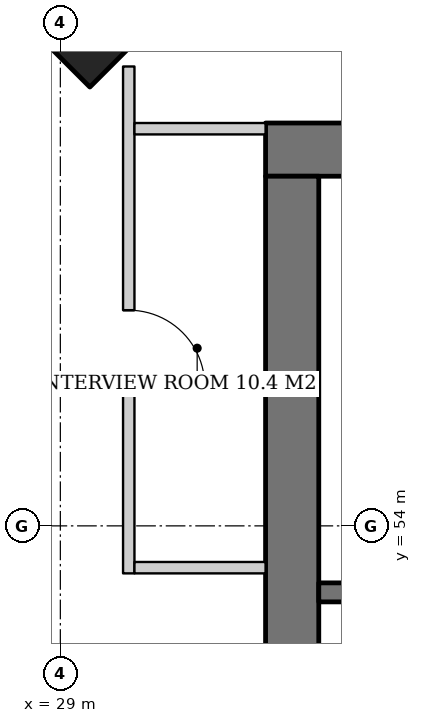
"""IFC4 building model, lengths in metres.
Left out: names, types, materials, properties, quantities, classifications, styles, units other than length and angle.
Written with IfcOpenShell. Run it as: python <this file> out.ifc"""

import sys

from ifc_helpers import new_model, si_unit, direction, frame, frame_2d, origin, origin_2d, place, context, subcontext, project, spatial, rectangle, extrude, element, fill, save


model = new_model("IFC4")
c1 = context("Model", 3, precision=1e-05, world=origin(), true_north=direction((0.0, 1.0)))
c2 = subcontext(c1, "Body", "Model", "MODEL_VIEW")
j1 = project(units=[si_unit("LENGTHUNIT", "METRE"), si_unit("PLANEANGLEUNIT", "RADIAN")], contexts=[c1])
p1 = place(None, origin())
s1 = spatial("IfcSite", under=j1, at=p1, CompositionType="ELEMENT")
p2 = place(p1, origin())
s2 = spatial("IfcBuilding", under=s1, at=p2, CompositionType="ELEMENT")
p3 = place(p2, frame((0.0, 0.0, 154.0)))
s3 = spatial("IfcBuildingStorey", under=s2, at=p3, CompositionType="ELEMENT", Elevation=154.0)
p4 = place(p3, frame((29.35, 61.65, 0.0), z_axis=(0.031898107953, -0.031898107953, 0.998981992539), x_axis=(0.707106781187, 0.707106781187, 0.0)))
e1 = element("IfcColumn", 1, at=p4, inside=s3, PredefinedType="COLUMN", context=c2, shape_type="SweptSolid", body=[
    extrude(rectangle(XDim=2.6, YDim=2.6, at=origin_2d()), origin(), (0.0, 0.0, 1.0), 3.804),
])
p5 = place(p3, frame((31.7, 58.95, 0.0), z_axis=(0.0, 0.0, 1.0), x_axis=(1.0, 0.0, 0.0)))
e2 = element("IfcWall", 2, at=p5, inside=s3, PredefinedType="SHEAR", context=c2, shape_type="SweptSolid", body=[
    extrude(rectangle(XDim=26.6, YDim=0.7, at=frame_2d((13.3, 0.0))), origin(), (0.0, 0.0, 1.0), 3.8),
])
p6 = place(p5, frame((17.94, 0.0, 0.0)))
e3 = element("IfcOpeningElement", 3, at=p6, cuts=e2, PredefinedType="OPENING", context=c2, shape_type="SweptSolid", body=[
    extrude(rectangle(XDim=1.0, YDim=2.1, at=frame_2d((0.5, 1.05))), frame((0.0, 0.36, 0.0), z_axis=(0.0, -1.0, 0.0), x_axis=(1.0, 0.0, 0.0)), (0.0, 0.0, 1.0), 0.72),
])
p7 = place(p5, frame((5.825, 0.0, 0.0)))
e4 = element("IfcOpeningElement", 4, at=p7, cuts=e2, PredefinedType="OPENING", context=c2, shape_type="SweptSolid", body=[
    extrude(rectangle(XDim=1.0, YDim=2.1, at=frame_2d((0.5, 1.05))), frame((0.0, 0.36, 0.0), z_axis=(0.0, -1.0, 0.0), x_axis=(1.0, 0.0, 0.0)), (0.0, 0.0, 1.0), 0.72),
])
p8 = place(p5, frame((1.837, 0.0, 0.0)))
e5 = element("IfcOpeningElement", 5, at=p8, cuts=e2, PredefinedType="OPENING", context=c2, shape_type="SweptSolid", body=[
    extrude(rectangle(XDim=1.0, YDim=2.1, at=frame_2d((0.5, 1.05))), frame((0.0, 0.36, 0.0), z_axis=(0.0, -1.0, 0.0), x_axis=(1.0, 0.0, 0.0)), (0.0, 0.0, 1.0), 0.72),
])
p9 = place(p5, frame((3.781, 0.0, 0.0)))
e6 = element("IfcOpeningElement", 6, at=p9, cuts=e2, PredefinedType="OPENING", context=c2, shape_type="SweptSolid", body=[
    extrude(rectangle(XDim=1.0, YDim=2.1, at=frame_2d((0.5, 1.05))), frame((0.0, 0.36, 0.0), z_axis=(0.0, -1.0, 0.0), x_axis=(1.0, 0.0, 0.0)), (0.0, 0.0, 1.0), 0.72),
])
p10 = place(p5, frame((7.95, 0.0, 0.0)))
e7 = element("IfcOpeningElement", 7, at=p10, cuts=e2, PredefinedType="OPENING", context=c2, shape_type="SweptSolid", body=[
    extrude(rectangle(XDim=1.0, YDim=2.1, at=frame_2d((0.5, 1.05))), frame((0.0, 0.36, 0.0), z_axis=(0.0, -1.0, 0.0), x_axis=(1.0, 0.0, 0.0)), (0.0, 0.0, 1.0), 0.72),
])
p11 = place(p5, frame((11.038, 0.0, 0.0)))
e8 = element("IfcOpeningElement", 8, at=p11, cuts=e2, PredefinedType="OPENING", context=c2, shape_type="SweptSolid", body=[
    extrude(rectangle(XDim=1.0, YDim=2.1, at=frame_2d((0.5, 1.05))), frame((0.0, 0.36, 0.0), z_axis=(0.0, -1.0, 0.0), x_axis=(1.0, 0.0, 0.0)), (0.0, 0.0, 1.0), 0.72),
])
p12 = place(p5, frame((14.666, 0.0, 0.0)))
e9 = element("IfcOpeningElement", 9, at=p12, cuts=e2, PredefinedType="OPENING", context=c2, shape_type="SweptSolid", body=[
    extrude(rectangle(XDim=1.0, YDim=2.1, at=frame_2d((0.5, 1.05))), frame((0.0, 0.36, 0.0), z_axis=(0.0, -1.0, 0.0), x_axis=(1.0, 0.0, 0.0)), (0.0, 0.0, 1.0), 0.72),
])
p13 = place(p5, frame((20.9, 0.0, 0.0)))
e10 = element("IfcOpeningElement", 10, at=p13, cuts=e2, PredefinedType="OPENING", context=c2, shape_type="SweptSolid", body=[
    extrude(rectangle(XDim=1.0, YDim=2.1, at=frame_2d((0.5, 1.05))), frame((0.0, 0.36, 0.0), z_axis=(0.0, -1.0, 0.0), x_axis=(1.0, 0.0, 0.0)), (0.0, 0.0, 1.0), 0.72),
])
p14 = place(p5, frame((23.75, 0.0, 0.0)))
e11 = element("IfcOpeningElement", 11, at=p14, cuts=e2, PredefinedType="OPENING", context=c2, shape_type="SweptSolid", body=[
    extrude(rectangle(XDim=1.0, YDim=2.1, at=frame_2d((0.5, 1.05))), frame((0.0, 0.36, 0.0), z_axis=(0.0, -1.0, 0.0), x_axis=(1.0, 0.0, 0.0)), (0.0, 0.0, 1.0), 0.72),
])
p15 = place(p3, frame((32.05, 33.4, 0.0), z_axis=(0.0, 0.0, 1.0), x_axis=(0.0, 1.0, 0.0)))
e12 = element("IfcWall", 12, at=p15, inside=s3, PredefinedType="SHEAR", context=c2, shape_type="SweptSolid", body=[
    extrude(rectangle(XDim=25.2, YDim=0.7, at=frame_2d((12.6, 0.0))), origin(), (0.0, 0.0, 1.0), 3.8),
])
p16 = place(p15, frame((11.7, 0.0, 0.0)))
e13 = element("IfcOpeningElement", 13, at=p16, cuts=e12, PredefinedType="OPENING", context=c2, shape_type="SweptSolid", body=[
    extrude(rectangle(XDim=1.8, YDim=2.4, at=frame_2d((0.9, 1.2))), frame((0.0, 0.36, 0.0), z_axis=(0.0, -1.0, 0.0), x_axis=(1.0, 0.0, 0.0)), (0.0, 0.0, 1.0), 0.72),
])
p17 = place(p15, frame((3.6, 0.0, 0.0)))
e14 = element("IfcOpeningElement", 14, at=p17, cuts=e12, PredefinedType="OPENING", context=c2, shape_type="SweptSolid", body=[
    extrude(rectangle(XDim=1.0, YDim=2.1, at=frame_2d((0.5, 1.05))), frame((0.0, 0.36, 0.0), z_axis=(0.0, -1.0, 0.0), x_axis=(1.0, 0.0, 0.0)), (0.0, 0.0, 1.0), 0.72),
])
p18 = place(p15, frame((6.35, 0.0, 0.0)))
e15 = element("IfcOpeningElement", 15, at=p18, cuts=e12, PredefinedType="OPENING", context=c2, shape_type="SweptSolid", body=[
    extrude(rectangle(XDim=1.0, YDim=2.1, at=frame_2d((0.5, 1.05))), frame((0.0, 0.36, 0.0), z_axis=(0.0, -1.0, 0.0), x_axis=(1.0, 0.0, 0.0)), (0.0, 0.0, 1.0), 0.72),
])
p19 = place(p15, frame((9.1, 0.0, 0.0)))
e16 = element("IfcOpeningElement", 16, at=p19, cuts=e12, PredefinedType="OPENING", context=c2, shape_type="SweptSolid", body=[
    extrude(rectangle(XDim=1.0, YDim=2.1, at=frame_2d((0.5, 1.05))), frame((0.0, 0.36, 0.0), z_axis=(0.0, -1.0, 0.0), x_axis=(1.0, 0.0, 0.0)), (0.0, 0.0, 1.0), 0.72),
])
p20 = place(p15, frame((15.1, 0.0, 0.0)))
e17 = element("IfcOpeningElement", 17, at=p20, cuts=e12, PredefinedType="OPENING", context=c2, shape_type="SweptSolid", body=[
    extrude(rectangle(XDim=1.0, YDim=2.1, at=frame_2d((0.5, 1.05))), frame((0.0, 0.36, 0.0), z_axis=(0.0, -1.0, 0.0), x_axis=(1.0, 0.0, 0.0)), (0.0, 0.0, 1.0), 0.72),
])
p21 = place(p15, frame((17.85, 0.0, 0.0)))
e18 = element("IfcOpeningElement", 18, at=p21, cuts=e12, PredefinedType="OPENING", context=c2, shape_type="SweptSolid", body=[
    extrude(rectangle(XDim=1.0, YDim=2.1, at=frame_2d((0.5, 1.05))), frame((0.0, 0.36, 0.0), z_axis=(0.0, -1.0, 0.0), x_axis=(1.0, 0.0, 0.0)), (0.0, 0.0, 1.0), 0.72),
])
p22 = place(p3, frame((32.4, 53.125, 0.0), z_axis=(0.0, 0.0, 1.0), x_axis=(1.0, 0.0, 0.0)))
e19 = element("IfcWall", 19, at=p22, inside=s3, PredefinedType="SHEAR", context=c2, shape_type="SweptSolid", body=[
    extrude(rectangle(XDim=2.7, YDim=0.25, at=frame_2d((1.35, 0.0))), origin(), (0.0, 0.0, 1.0), 3.8),
])
p23 = place(p3, frame((29.9, 60.044, 0.0), z_axis=(0.0, 0.0, 1.0), x_axis=(0.0, -1.0, 0.0)))
e20 = element("IfcWall", 20, at=p23, inside=s3, PredefinedType="PARTITIONING", context=c2, shape_type="SweptSolid", body=[
    extrude(rectangle(XDim=6.669, YDim=0.15, at=frame_2d((3.334, 0.0))), origin(), (0.0, 0.0, 1.0), 2.706),
])
p24 = place(p23, frame((3.206, 0.0, 0.0)))
e21 = element("IfcOpeningElement", 21, at=p24, cuts=e20, PredefinedType="OPENING", context=c2, shape_type="SweptSolid", body=[
    extrude(rectangle(XDim=1.0, YDim=2.1, at=frame_2d((0.5, 1.05))), frame((0.0, 0.085, 0.0), z_axis=(0.0, -1.0, 0.0), x_axis=(1.0, 0.0, 0.0)), (0.0, 0.0, 1.0), 0.17),
])
for number, where, z_axis, x_axis in (
    (22, (31.7, 59.225, 0.0), (0.0, 0.0, 1.0), (-1.0, 0.0, 0.0)),
    (23, (31.7, 53.45, 0.0), (0.0, 0.0, 1.0), (-1.0, 0.0, 0.0)),
):
    element("IfcWall", number, at=place(p3, frame(where, z_axis=z_axis, x_axis=x_axis)), inside=s3, PredefinedType="PARTITIONING", context=c2, shape_type="SweptSolid", body=[
        extrude(rectangle(XDim=1.725, YDim=0.15, at=frame_2d((0.862, 0.0))), origin(), (0.0, 0.0, 1.0), 3.52),
    ])
p25 = place(p24, origin())
e24 = element("IfcDoor", 24, at=p25, inside=s3, OperationType="SINGLE_SWING_RIGHT", PredefinedType="DOOR", context=c2, shape_type="SweptSolid", body=[
    extrude(rectangle(XDim=1.0, YDim=2.1, at=frame_2d((0.5, 1.05))), frame((0.0, 0.025, 0.0), z_axis=(0.0, -1.0, 0.0), x_axis=(1.0, 0.0, 0.0)), (0.0, 0.0, 1.0), 0.05),
])
fill(e21, e24)
save(model, sys.argv[1])
